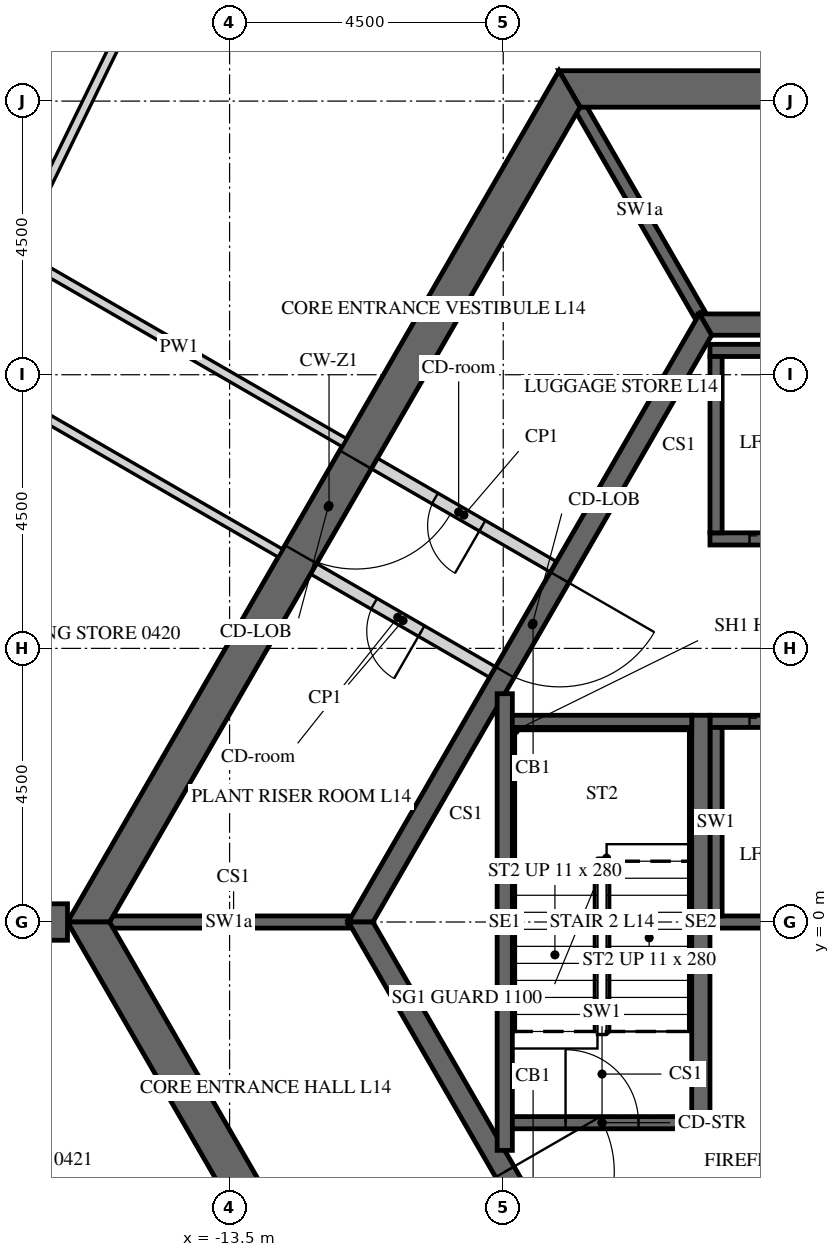
"""IFC4 building model, lengths in metres.
Left out: names, types, materials, properties, quantities, classifications, styles, units other than length and angle.
Written with IfcOpenShell. Run it as: python <this file> out.ifc"""

import sys

from ifc_helpers import new_model, si_unit, direction, frame, frame_2d, origin, place, context, subcontext, project, spatial, polyline, rectangle, outline, extrude, element, fill, save


model = new_model("IFC4")
c1 = context("Model", 3, precision=1e-05, world=origin(), true_north=direction((0.0, 1.0)))
c2 = subcontext(c1, "Body", "Model", "MODEL_VIEW")
j1 = project(units=[si_unit("LENGTHUNIT", "METRE"), si_unit("PLANEANGLEUNIT", "RADIAN")], contexts=[c1])
p1 = place(None, origin())
s1 = spatial("IfcSite", under=j1, at=p1, CompositionType="ELEMENT")
p2 = place(p1, origin())
s2 = spatial("IfcBuilding", under=s1, at=p2, CompositionType="ELEMENT")
p3 = place(p2, frame((0.0, 0.0, 68.7)))
s3 = spatial("IfcBuildingStorey", under=s2, at=p3, CompositionType="ELEMENT", Elevation=68.7)
p4 = place(p3, frame((-7.91, 13.7, -0.15), z_axis=(0.0, 0.0, 1.0), x_axis=(-0.499999880136, -0.866025472988, 0.0)))
e1 = element("IfcWall", 1, at=p4, inside=s3, PredefinedType="SHEAR", context=c2, shape_type="SweptSolid", body=[
    extrude(outline(polyline([(-0.173, -0.3), (15.993, -0.3), (15.646, 0.3), (0.173, 0.3), (-0.173, -0.3)])), origin(), (0.0, 0.0, 1.0), 3.9),
])
p5 = place(p4, frame((7.039, 0.0, 0.15)))
e2 = element("IfcOpeningElement", 2, at=p5, cuts=e1, PredefinedType="OPENING", context=c2, shape_type="SweptSolid", body=[
    extrude(rectangle(XDim=1.8, YDim=2.4, at=frame_2d((0.9, 1.2))), frame((0.0, 0.31, 0.0), z_axis=(0.0, -1.0, 0.0), x_axis=(1.0, 0.0, 0.0)), (0.0, 0.0, 1.0), 0.62),
])
p6 = place(p3, frame((-15.819, 0.0, -0.15), z_axis=(0.0, 0.0, 1.0), x_axis=(0.499999880136, -0.866025472988, 0.0)))
e3 = element("IfcWall", 3, at=p6, inside=s3, PredefinedType="SHEAR", context=c2, shape_type="SweptSolid", body=[
    extrude(outline(polyline([(-0.173, -0.3), (15.993, -0.3), (15.646, 0.3), (0.173, 0.3), (-0.173, -0.3)])), origin(), (0.0, 0.0, 1.0), 3.9),
])
p7 = place(p6, frame((6.981, 0.0, 0.15)))
e4 = element("IfcOpeningElement", 4, at=p7, cuts=e3, PredefinedType="OPENING", context=c2, shape_type="SweptSolid", body=[
    extrude(rectangle(XDim=1.8, YDim=2.4, at=frame_2d((0.9, 1.2))), frame((0.0, 0.31, 0.0), z_axis=(0.0, -1.0, 0.0), x_axis=(1.0, 0.0, 0.0)), (0.0, 0.0, 1.0), 0.62),
])
p8 = place(p3, frame((7.91, 13.7, -0.15), z_axis=(0.0, 0.0, 1.0), x_axis=(-1.0, 0.0, 0.0)))
e5 = element("IfcWall", 5, at=p8, inside=s3, PredefinedType="SHEAR", context=c2, shape_type="SweptSolid", body=[
    extrude(outline(polyline([(-0.173, -0.3), (15.993, -0.3), (15.646, 0.3), (0.173, 0.3), (-0.173, -0.3)])), origin(), (0.0, 0.0, 1.0), 3.9),
])
p9 = place(p8, frame((7.31, 0.0, 0.15)))
e6 = element("IfcOpeningElement", 6, at=p9, cuts=e5, PredefinedType="OPENING", context=c2, shape_type="SweptSolid", body=[
    extrude(rectangle(XDim=1.2, YDim=2.4, at=frame_2d((0.6, 1.2))), frame((0.0, 0.31, 0.0), z_axis=(0.0, -1.0, 0.0), x_axis=(1.0, 0.0, 0.0)), (0.0, 0.0, 1.0), 0.62),
])
p10 = place(p3, frame((-16.166, 0.0, -0.15), z_axis=(0.0, 0.0, 1.0), x_axis=(-1.0, 0.0, 0.0)))
e7 = element("IfcWall", 7, at=p10, inside=s3, PredefinedType="SHEAR", context=c2, shape_type="SweptSolid", body=[
    extrude(rectangle(XDim=16.509, YDim=0.6, at=frame_2d((8.254, 0.0))), origin(), (0.0, 0.0, 1.0), 3.9),
])
p11 = place(p10, frame((7.354, 0.0, 0.15)))
e8 = element("IfcOpeningElement", 8, at=p11, cuts=e7, PredefinedType="OPENING", context=c2, shape_type="SweptSolid", body=[
    extrude(rectangle(XDim=1.8, YDim=2.4, at=frame_2d((0.9, 1.2))), frame((0.0, 0.31, 0.0), z_axis=(0.0, -1.0, 0.0), x_axis=(1.0, 0.0, 0.0)), (0.0, 0.0, 1.0), 0.62),
])
p12 = place(p3, frame((-5.673, 9.825, -0.15), z_axis=(0.0, 0.0, 1.0), x_axis=(-0.499995046907, -0.866028263435, 0.0)))
e9 = element("IfcWall", 9, at=p12, inside=s3, PredefinedType="SHEAR", context=c2, shape_type="SweptSolid", body=[
    extrude(outline(polyline([(-0.101, -0.175), (11.446, -0.175), (11.244, 0.175), (0.101, 0.175), (-0.101, -0.175)])), origin(), (0.0, 0.0, 1.0), 3.9),
])
p13 = place(p12, frame((4.801, 0.0, 0.15)))
e10 = element("IfcOpeningElement", 10, at=p13, cuts=e9, PredefinedType="OPENING", context=c2, shape_type="SweptSolid", body=[
    extrude(rectangle(XDim=1.8, YDim=2.4, at=frame_2d((0.9, 1.2))), frame((0.0, 0.185, 0.0), z_axis=(0.0, -1.0, 0.0), x_axis=(1.0, 0.0, 0.0)), (0.0, 0.0, 1.0), 0.37),
])
p14 = place(p3, frame((-11.345, 0.0, -0.15), z_axis=(0.0, 0.0, 1.0), x_axis=(0.499995046907, -0.866028263435, 0.0)))
e11 = element("IfcWall", 11, at=p14, inside=s3, PredefinedType="SHEAR", context=c2, shape_type="SweptSolid", body=[
    extrude(outline(polyline([(-0.101, -0.175), (11.446, -0.175), (11.244, 0.175), (0.101, 0.175), (-0.101, -0.175)])), origin(), (0.0, 0.0, 1.0), 3.9),
])
p15 = place(p14, frame((4.744, 0.0, 0.15)))
e12 = element("IfcOpeningElement", 12, at=p15, cuts=e11, PredefinedType="OPENING", context=c2, shape_type="SweptSolid", body=[
    extrude(rectangle(XDim=1.8, YDim=2.4, at=frame_2d((0.9, 1.2))), frame((0.0, 0.185, 0.0), z_axis=(0.0, -1.0, 0.0), x_axis=(1.0, 0.0, 0.0)), (0.0, 0.0, 1.0), 0.37),
])
p16 = place(p3, frame((5.673, 9.825, -0.15), z_axis=(0.0, 0.0, 1.0), x_axis=(-1.0, 0.0, 0.0)))
e13 = element("IfcWall", 13, at=p16, inside=s3, PredefinedType="SHEAR", context=c2, shape_type="SweptSolid", body=[
    extrude(outline(polyline([(-0.101, -0.175), (11.446, -0.175), (11.244, 0.175), (0.101, 0.175), (-0.101, -0.175)])), origin(), (0.0, 0.0, 1.0), 3.9),
])
p17 = place(p3, frame((-5.6, 6.3, -0.25), z_axis=(0.0, 0.0, 1.0), x_axis=(1.0, 0.0, 0.0)))
e14 = element("IfcWall", 14, at=p17, inside=s3, PredefinedType="SHEAR", context=c2, shape_type="SweptSolid", body=[
    extrude(rectangle(XDim=11.2, YDim=0.2, at=frame_2d((5.6, 0.0))), origin(), (0.0, 0.0, 1.0), 3.9),
])
p18 = place(p17, frame((0.65, 0.0, 0.25)))
e15 = element("IfcOpeningElement", 15, at=p18, cuts=e14, PredefinedType="OPENING", context=c2, shape_type="SweptSolid", body=[
    extrude(rectangle(XDim=1.1, YDim=2.1, at=frame_2d((0.55, 1.05))), frame((0.0, 0.11, 0.0), z_axis=(0.0, -1.0, 0.0), x_axis=(1.0, 0.0, 0.0)), (0.0, 0.0, 1.0), 0.22),
])
p19 = place(p17, frame((2.85, 0.0, 0.25)))
e16 = element("IfcOpeningElement", 16, at=p19, cuts=e14, PredefinedType="OPENING", context=c2, shape_type="SweptSolid", body=[
    extrude(rectangle(XDim=1.1, YDim=2.1, at=frame_2d((0.55, 1.05))), frame((0.0, 0.11, 0.0), z_axis=(0.0, -1.0, 0.0), x_axis=(1.0, 0.0, 0.0)), (0.0, 0.0, 1.0), 0.22),
])
p20 = place(p17, frame((5.05, 0.0, 0.25)))
e17 = element("IfcOpeningElement", 17, at=p20, cuts=e14, PredefinedType="OPENING", context=c2, shape_type="SweptSolid", body=[
    extrude(rectangle(XDim=1.1, YDim=2.1, at=frame_2d((0.55, 1.05))), frame((0.0, 0.11, 0.0), z_axis=(0.0, -1.0, 0.0), x_axis=(1.0, 0.0, 0.0)), (0.0, 0.0, 1.0), 0.22),
])
p21 = place(p17, frame((7.25, 0.0, 0.25)))
e18 = element("IfcOpeningElement", 18, at=p21, cuts=e14, PredefinedType="OPENING", context=c2, shape_type="SweptSolid", body=[
    extrude(rectangle(XDim=1.1, YDim=2.1, at=frame_2d((0.55, 1.05))), frame((0.0, 0.11, 0.0), z_axis=(0.0, -1.0, 0.0), x_axis=(1.0, 0.0, 0.0)), (0.0, 0.0, 1.0), 0.22),
])
p22 = place(p17, frame((9.45, 0.0, 0.25)))
e19 = element("IfcOpeningElement", 19, at=p22, cuts=e14, PredefinedType="OPENING", context=c2, shape_type="SweptSolid", body=[
    extrude(rectangle(XDim=1.1, YDim=2.1, at=frame_2d((0.55, 1.05))), frame((0.0, 0.11, 0.0), z_axis=(0.0, -1.0, 0.0), x_axis=(1.0, 0.0, 0.0)), (0.0, 0.0, 1.0), 0.22),
])
p23 = place(p3, frame((-5.6, 9.4, -0.25), z_axis=(0.0, 0.0, 1.0), x_axis=(1.0, 0.0, 0.0)))
e20 = element("IfcWall", 20, at=p23, inside=s3, PredefinedType="SHEAR", context=c2, shape_type="SweptSolid", body=[
    extrude(rectangle(XDim=11.2, YDim=0.2, at=frame_2d((5.6, 0.0))), origin(), (0.0, 0.0, 1.0), 3.9),
])
p24 = place(p3, frame((-5.5, 6.4, -0.25), z_axis=(0.0, 0.0, 1.0), x_axis=(0.0, 1.0, 0.0)))
e21 = element("IfcWall", 21, at=p24, inside=s3, PredefinedType="SHEAR", context=c2, shape_type="SweptSolid", body=[
    extrude(rectangle(XDim=2.9, YDim=0.2, at=frame_2d((1.45, 0.0))), origin(), (0.0, 0.0, 1.0), 3.9),
])
p25 = place(p3, frame((-5.6, 3.3, -0.25), z_axis=(0.0, 0.0, 1.0), x_axis=(1.0, 0.0, 0.0)))
e22 = element("IfcWall", 22, at=p25, inside=s3, PredefinedType="SHEAR", context=c2, shape_type="SweptSolid", body=[
    extrude(rectangle(XDim=11.2, YDim=0.2, at=frame_2d((5.6, 0.0))), origin(), (0.0, 0.0, 1.0), 3.9),
])
p26 = place(p25, frame((0.65, 0.0, 0.25)))
e23 = element("IfcOpeningElement", 23, at=p26, cuts=e22, PredefinedType="OPENING", context=c2, shape_type="SweptSolid", body=[
    extrude(rectangle(XDim=1.1, YDim=2.1, at=frame_2d((0.55, 1.05))), frame((0.0, 0.11, 0.0), z_axis=(0.0, -1.0, 0.0), x_axis=(1.0, 0.0, 0.0)), (0.0, 0.0, 1.0), 0.22),
])
p27 = place(p25, frame((2.85, 0.0, 0.25)))
e24 = element("IfcOpeningElement", 24, at=p27, cuts=e22, PredefinedType="OPENING", context=c2, shape_type="SweptSolid", body=[
    extrude(rectangle(XDim=1.1, YDim=2.1, at=frame_2d((0.55, 1.05))), frame((0.0, 0.11, 0.0), z_axis=(0.0, -1.0, 0.0), x_axis=(1.0, 0.0, 0.0)), (0.0, 0.0, 1.0), 0.22),
])
p28 = place(p25, frame((5.05, 0.0, 0.25)))
e25 = element("IfcOpeningElement", 25, at=p28, cuts=e22, PredefinedType="OPENING", context=c2, shape_type="SweptSolid", body=[
    extrude(rectangle(XDim=1.1, YDim=2.1, at=frame_2d((0.55, 1.05))), frame((0.0, 0.11, 0.0), z_axis=(0.0, -1.0, 0.0), x_axis=(1.0, 0.0, 0.0)), (0.0, 0.0, 1.0), 0.22),
])
p29 = place(p25, frame((7.25, 0.0, 0.25)))
e26 = element("IfcOpeningElement", 26, at=p29, cuts=e22, PredefinedType="OPENING", context=c2, shape_type="SweptSolid", body=[
    extrude(rectangle(XDim=1.1, YDim=2.1, at=frame_2d((0.55, 1.05))), frame((0.0, 0.11, 0.0), z_axis=(0.0, -1.0, 0.0), x_axis=(1.0, 0.0, 0.0)), (0.0, 0.0, 1.0), 0.22),
])
p30 = place(p25, frame((9.45, 0.0, 0.25)))
e27 = element("IfcOpeningElement", 27, at=p30, cuts=e22, PredefinedType="OPENING", context=c2, shape_type="SweptSolid", body=[
    extrude(rectangle(XDim=1.1, YDim=2.1, at=frame_2d((0.55, 1.05))), frame((0.0, 0.11, 0.0), z_axis=(0.0, -1.0, 0.0), x_axis=(1.0, 0.0, 0.0)), (0.0, 0.0, 1.0), 0.22),
])
p31 = place(p3, frame((-5.6, 0.0, -0.25), z_axis=(0.0, 0.0, 1.0), x_axis=(1.0, 0.0, 0.0)))
e28 = element("IfcWall", 28, at=p31, inside=s3, PredefinedType="SHEAR", context=c2, shape_type="SweptSolid", body=[
    extrude(rectangle(XDim=11.2, YDim=0.2, at=frame_2d((5.6, 0.0))), origin(), (0.0, 0.0, 1.0), 3.9),
])
p32 = place(p3, frame((-5.5, 0.1, -0.25), z_axis=(0.0, 0.0, 1.0), x_axis=(0.0, 1.0, 0.0)))
e29 = element("IfcWall", 29, at=p32, inside=s3, PredefinedType="SHEAR", context=c2, shape_type="SweptSolid", body=[
    extrude(rectangle(XDim=3.1, YDim=0.2, at=frame_2d((1.55, 0.0))), origin(), (0.0, 0.0, 1.0), 3.9),
])
p33 = place(p3, frame((-5.773, 10.0, -0.15), z_axis=(0.0, 0.0, 1.0), x_axis=(-0.500038251005, 0.86600331843, 0.0)))
e30 = element("IfcWall", 30, at=p33, inside=s3, PredefinedType="SHEAR", context=c2, shape_type="SweptSolid", body=[
    extrude(rectangle(XDim=3.926, YDim=0.2, at=frame_2d((1.963, 0.0))), origin(), (0.0, 0.0, 1.0), 3.9),
])
p34 = place(p3, frame((-11.547, 0.0, -0.15), z_axis=(0.0, 0.0, 1.0), x_axis=(-1.0, 0.0, 0.0)))
e31 = element("IfcWall", 31, at=p34, inside=s3, PredefinedType="SHEAR", context=c2, shape_type="SweptSolid", body=[
    extrude(rectangle(XDim=3.926, YDim=0.2, at=frame_2d((1.963, 0.0))), origin(), (0.0, 0.0, 1.0), 3.9),
])
p35 = place(p3, frame((-9.175, 4.109, 0.0), z_axis=(0.0, 0.0, 1.0), x_axis=(-0.865989465428, 0.500062241894, 0.0)))
e32 = element("IfcWall", 32, at=p35, inside=s3, PredefinedType="PARTITIONING", context=c2, shape_type="SweptSolid", body=[
    extrude(rectangle(XDim=3.4, YDim=0.2, at=frame_2d((1.7, 0.0))), origin(), (0.0, 0.0, 1.0), 3.65),
])
p36 = place(p35, frame((1.351, 0.0, 0.0)))
e33 = element("IfcOpeningElement", 33, at=p36, cuts=e32, PredefinedType="OPENING", context=c2, shape_type="SweptSolid", body=[
    extrude(rectangle(XDim=0.9, YDim=2.1, at=frame_2d((0.45, 1.05))), frame((0.0, 0.11, 0.0), z_axis=(0.0, -1.0, 0.0), x_axis=(1.0, 0.0, 0.0)), (0.0, 0.0, 1.0), 0.22),
])
p37 = place(p3, frame((-8.175, 5.841, 0.0), z_axis=(0.0, 0.0, 1.0), x_axis=(-0.866020560687, 0.500008388397, 0.0)))
e34 = element("IfcWall", 34, at=p37, inside=s3, PredefinedType="PARTITIONING", context=c2, shape_type="SweptSolid", body=[
    extrude(rectangle(XDim=3.4, YDim=0.2, at=frame_2d((1.7, 0.0))), origin(), (0.0, 0.0, 1.0), 3.65),
])
p38 = place(p37, frame((1.35, 0.0, 0.0)))
e35 = element("IfcOpeningElement", 35, at=p38, cuts=e34, PredefinedType="OPENING", context=c2, shape_type="SweptSolid", body=[
    extrude(rectangle(XDim=0.9, YDim=2.1, at=frame_2d((0.45, 1.05))), frame((0.0, 0.11, 0.0), z_axis=(0.0, -1.0, 0.0), x_axis=(1.0, 0.0, 0.0)), (0.0, 0.0, 1.0), 0.22),
])
p39 = place(p3, frame((-5.75, -3.4, -0.25), z_axis=(0.0, 0.0, 1.0), x_axis=(0.0, 1.0, 0.0)))
e36 = element("IfcWall", 36, at=p39, inside=s3, PredefinedType="SHEAR", context=c2, shape_type="SweptSolid", body=[
    extrude(rectangle(XDim=6.8, YDim=0.3, at=frame_2d((3.4, 0.0))), origin(), (0.0, 0.0, 1.0), 3.9),
])
p40 = place(p3, frame((-8.975, -3.755, -0.25), z_axis=(0.0, 0.0, 1.0), x_axis=(0.0, 1.0, 0.0)))
e37 = element("IfcWall", 37, at=p40, inside=s3, PredefinedType="SHEAR", context=c2, shape_type="SweptSolid", body=[
    extrude(rectangle(XDim=7.51, YDim=0.25, at=frame_2d((3.755, 0.0))), origin(), (0.0, 0.0, 1.0), 3.9),
])
p41 = place(p3, frame((-8.85, 3.3, -0.25), z_axis=(0.0, 0.0, 1.0), x_axis=(1.0, 0.0, 0.0)))
e38 = element("IfcWall", 38, at=p41, inside=s3, PredefinedType="SHEAR", context=c2, shape_type="SweptSolid", body=[
    extrude(rectangle(XDim=2.95, YDim=0.2, at=frame_2d((1.475, 0.0))), origin(), (0.0, 0.0, 1.0), 3.9),
])
p42 = place(p3, frame((-8.85, -3.3, -0.25), z_axis=(0.0, 0.0, 1.0), x_axis=(1.0, 0.0, 0.0)))
e39 = element("IfcWall", 39, at=p42, inside=s3, PredefinedType="SHEAR", context=c2, shape_type="SweptSolid", body=[
    extrude(rectangle(XDim=2.95, YDim=0.2, at=frame_2d((1.475, 0.0))), origin(), (0.0, 0.0, 1.0), 3.9),
])
p43 = place(p42, frame((0.875, 0.0, 0.25)))
e40 = element("IfcOpeningElement", 40, at=p43, cuts=e39, PredefinedType="OPENING", context=c2, shape_type="SweptSolid", body=[
    extrude(rectangle(XDim=1.2, YDim=2.4, at=frame_2d((0.6, 1.2))), frame((0.0, 0.11, 0.0), z_axis=(0.0, -1.0, 0.0), x_axis=(1.0, 0.0, 0.0)), (0.0, 0.0, 1.0), 0.22),
])
p44 = place(p3, frame((-13.752, 21.875, 0.0), z_axis=(0.0, 0.0, 1.0), x_axis=(-0.438374473378, -0.898792423806, 0.0)))
e41 = element("IfcWall", 41, at=p44, inside=s3, PredefinedType="PARTITIONING", context=c2, shape_type="SweptSolid", body=[
    extrude(rectangle(XDim=21.918, YDim=0.15, at=frame_2d((10.959, 0.0))), origin(), (0.0, 0.0, 1.0), 2.988),
])
p45 = place(p44, frame((0.371, 0.0, 0.0)))
e42 = element("IfcOpeningElement", 42, at=p45, cuts=e41, PredefinedType="OPENING", context=c2, shape_type="SweptSolid", body=[
    extrude(rectangle(XDim=1.0, YDim=2.1, at=frame_2d((0.5, 1.05))), frame((0.0, 0.085, 0.0), z_axis=(0.0, -1.0, 0.0), x_axis=(1.0, 0.0, 0.0)), (0.0, 0.0, 1.0), 0.17),
])
p46 = place(p44, frame((6.171, 0.0, 0.0)))
e43 = element("IfcOpeningElement", 43, at=p46, cuts=e41, PredefinedType="OPENING", context=c2, shape_type="SweptSolid", body=[
    extrude(rectangle(XDim=1.0, YDim=2.1, at=frame_2d((0.5, 1.05))), frame((0.0, 0.085, 0.0), z_axis=(0.0, -1.0, 0.0), x_axis=(1.0, 0.0, 0.0)), (0.0, 0.0, 1.0), 0.17),
])
p47 = place(p44, frame((13.612, 0.0, 0.0)))
e44 = element("IfcOpeningElement", 44, at=p47, cuts=e41, PredefinedType="OPENING", context=c2, shape_type="SweptSolid", body=[
    extrude(rectangle(XDim=1.0, YDim=2.1, at=frame_2d((0.5, 1.05))), frame((0.0, 0.085, 0.0), z_axis=(0.0, -1.0, 0.0), x_axis=(1.0, 0.0, 0.0)), (0.0, 0.0, 1.0), 0.17),
])
p48 = place(p3, frame((-11.614, 7.884, 0.0), z_axis=(0.0, 0.0, 1.0), x_axis=(-0.866025438137, 0.4999999405, 0.0)))
e45 = element("IfcWall", 45, at=p48, inside=s3, PredefinedType="PARTITIONING", context=c2, shape_type="SweptSolid", body=[
    extrude(rectangle(XDim=6.271, YDim=0.15, at=frame_2d((3.135, 0.0))), origin(), (0.0, 0.0, 1.0), 2.988),
])
p49 = place(p3, frame((-17.011, 11.087, 0.0), z_axis=(0.0, 0.0, 1.0), x_axis=(0.43836877185, 0.898795204631, 0.0)))
e46 = element("IfcWall", 46, at=p49, inside=s3, PredefinedType="PARTITIONING", context=c2, shape_type="SweptSolid", body=[
    extrude(rectangle(XDim=10.083, YDim=0.15, at=frame_2d((5.042, 0.0))), origin(), (0.0, 0.0, 1.0), 2.988),
])
p50 = place(p3, frame((-17.902, 9.09, 0.0), z_axis=(0.0, 0.0, 1.0), x_axis=(0.866036368755, -0.499981007633, 0.0)))
e47 = element("IfcWall", 47, at=p50, inside=s3, PredefinedType="PARTITIONING", context=c2, shape_type="SweptSolid", body=[
    extrude(rectangle(XDim=6.049, YDim=0.15, at=frame_2d((3.024, 0.0))), origin(), (0.0, 0.0, 1.0), 2.988),
])
p51 = place(p3, frame((-24.09, -2.175, 0.0), z_axis=(0.0, 0.0, 1.0), x_axis=(0.499996832073, -0.86602723278, 0.0)))
e48 = element("IfcWall", 48, at=p51, inside=s3, PredefinedType="PARTITIONING", context=c2, shape_type="SweptSolid", body=[
    extrude(rectangle(XDim=23.877, YDim=0.15, at=frame_2d((11.938, 0.0))), origin(), (0.0, 0.0, 1.0), 2.988),
])
p52 = place(p51, frame((3.943, 0.0, 0.0)))
e49 = element("IfcOpeningElement", 49, at=p52, cuts=e48, PredefinedType="OPENING", context=c2, shape_type="SweptSolid", body=[
    extrude(rectangle(XDim=1.0, YDim=2.1, at=frame_2d((0.5, 1.05))), frame((0.0, 0.085, 0.0), z_axis=(0.0, -1.0, 0.0), x_axis=(1.0, 0.0, 0.0)), (0.0, 0.0, 1.0), 0.17),
])
p53 = place(p51, frame((15.672, 0.0, 0.0)))
e50 = element("IfcOpeningElement", 50, at=p53, cuts=e48, PredefinedType="OPENING", context=c2, shape_type="SweptSolid", body=[
    extrude(rectangle(XDim=1.0, YDim=2.1, at=frame_2d((0.5, 1.05))), frame((0.0, 0.085, 0.0), z_axis=(0.0, -1.0, 0.0), x_axis=(1.0, 0.0, 0.0)), (0.0, 0.0, 1.0), 0.17),
])
p54 = place(p51, frame((19.525, 0.0, 0.0)))
e51 = element("IfcOpeningElement", 51, at=p54, cuts=e48, PredefinedType="OPENING", context=c2, shape_type="SweptSolid", body=[
    extrude(rectangle(XDim=1.0, YDim=2.1, at=frame_2d((0.5, 1.05))), frame((0.0, 0.085, 0.0), z_axis=(0.0, -1.0, 0.0), x_axis=(1.0, 0.0, 0.0)), (0.0, 0.0, 1.0), 0.17),
])
p55 = place(p5, origin())
e52 = element("IfcDoor", 52, at=p55, inside=s3, OperationType="DOUBLE_DOOR_SINGLE_SWING", PredefinedType="DOOR", context=c2, shape_type="SweptSolid", body=[
    extrude(rectangle(XDim=1.8, YDim=2.4, at=frame_2d((0.9, 1.2))), frame((0.0, 0.025, 0.0), z_axis=(0.0, -1.0, 0.0), x_axis=(1.0, 0.0, 0.0)), (0.0, 0.0, 1.0), 0.05),
])
fill(e2, e52)
p56 = place(p13, origin())
e53 = element("IfcDoor", 53, at=p56, inside=s3, OperationType="DOUBLE_DOOR_SINGLE_SWING", PredefinedType="DOOR", context=c2, shape_type="SweptSolid", body=[
    extrude(rectangle(XDim=1.8, YDim=2.4, at=frame_2d((0.9, 1.2))), frame((0.0, 0.025, 0.0), z_axis=(0.0, -1.0, 0.0), x_axis=(1.0, 0.0, 0.0)), (0.0, 0.0, 1.0), 0.05),
])
fill(e10, e53)
p57 = place(p15, origin())
e54 = element("IfcDoor", 54, at=p57, inside=s3, OperationType="DOUBLE_DOOR_SINGLE_SWING", PredefinedType="DOOR", context=c2, shape_type="SweptSolid", body=[
    extrude(rectangle(XDim=1.8, YDim=2.4, at=frame_2d((0.9, 1.2))), frame((0.0, 0.025, 0.0), z_axis=(0.0, -1.0, 0.0), x_axis=(1.0, 0.0, 0.0)), (0.0, 0.0, 1.0), 0.05),
])
fill(e12, e54)
p58 = place(p36, origin())
e55 = element("IfcDoor", 55, at=p58, inside=s3, OperationType="SINGLE_SWING_LEFT", PredefinedType="DOOR", context=c2, shape_type="SweptSolid", body=[
    extrude(rectangle(XDim=0.9, YDim=2.1, at=frame_2d((0.45, 1.05))), frame((0.0, 0.025, 0.0), z_axis=(0.0, -1.0, 0.0), x_axis=(1.0, 0.0, 0.0)), (0.0, 0.0, 1.0), 0.05),
])
fill(e33, e55)
p59 = place(p38, origin())
e56 = element("IfcDoor", 56, at=p59, inside=s3, OperationType="SINGLE_SWING_LEFT", PredefinedType="DOOR", context=c2, shape_type="SweptSolid", body=[
    extrude(rectangle(XDim=0.9, YDim=2.1, at=frame_2d((0.45, 1.05))), frame((0.0, 0.025, 0.0), z_axis=(0.0, -1.0, 0.0), x_axis=(1.0, 0.0, 0.0)), (0.0, 0.0, 1.0), 0.05),
])
fill(e35, e56)
p60 = place(p43, origin())
e57 = element("IfcDoor", 57, at=p60, inside=s3, OperationType="SINGLE_SWING_LEFT", PredefinedType="DOOR", context=c2, shape_type="SweptSolid", body=[
    extrude(rectangle(XDim=1.2, YDim=2.4, at=frame_2d((0.6, 1.2))), frame((0.0, 0.025, 0.0), z_axis=(0.0, -1.0, 0.0), x_axis=(1.0, 0.0, 0.0)), (0.0, 0.0, 1.0), 0.05),
])
fill(e40, e57)
p61 = place(p18, origin())
e58 = element("IfcDoor", 58, at=p61, inside=s3, OperationType="SLIDING_TO_LEFT", PredefinedType="DOOR", context=c2, shape_type="SweptSolid", body=[
    extrude(rectangle(XDim=1.1, YDim=2.1, at=frame_2d((0.55, 1.05))), frame((0.0, 0.025, 0.0), z_axis=(0.0, -1.0, 0.0), x_axis=(1.0, 0.0, 0.0)), (0.0, 0.0, 1.0), 0.05),
])
fill(e15, e58)
p62 = place(p26, origin())
e59 = element("IfcDoor", 59, at=p62, inside=s3, OperationType="SLIDING_TO_LEFT", PredefinedType="DOOR", context=c2, shape_type="SweptSolid", body=[
    extrude(rectangle(XDim=1.1, YDim=2.1, at=frame_2d((0.55, 1.05))), frame((0.0, 0.025, 0.0), z_axis=(0.0, -1.0, 0.0), x_axis=(1.0, 0.0, 0.0)), (0.0, 0.0, 1.0), 0.05),
])
fill(e23, e59)
save(model, sys.argv[1])
